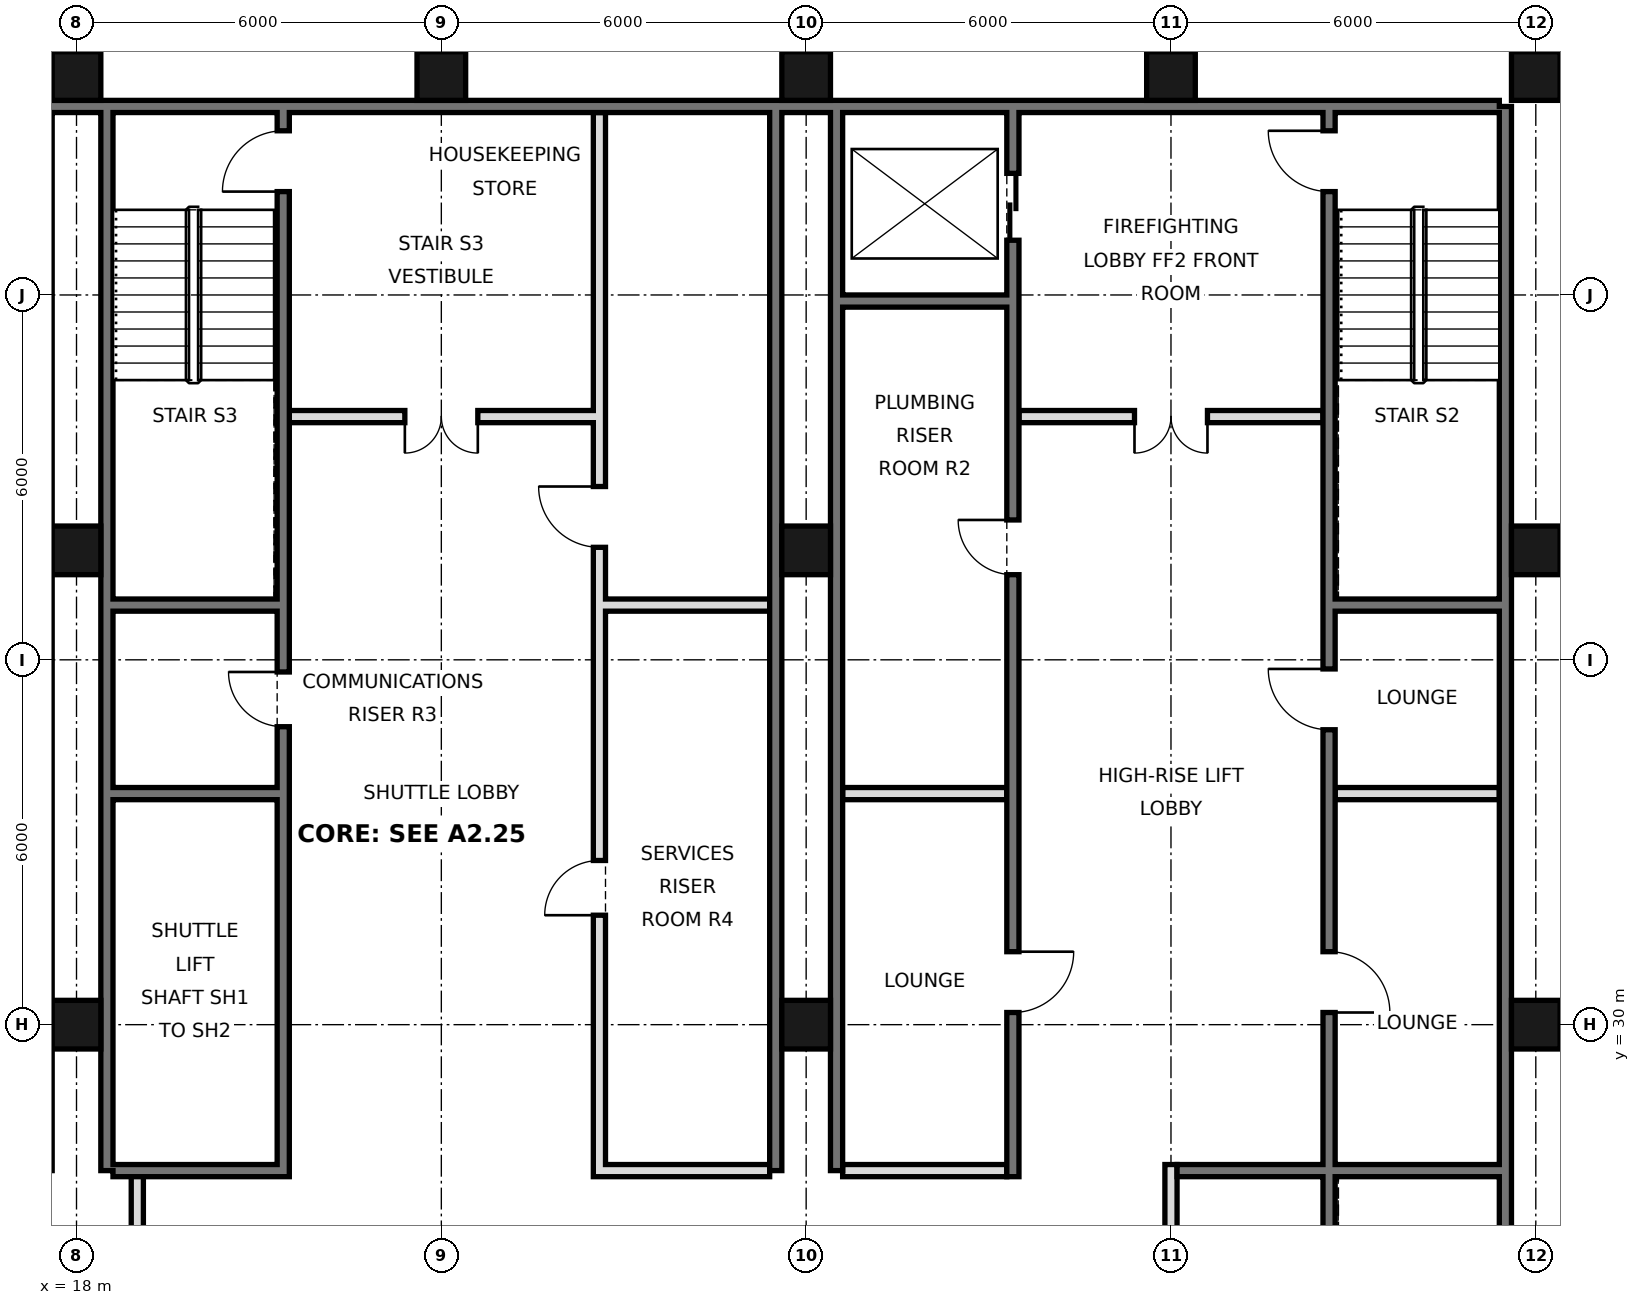
"""IFC4 building model, lengths in metres.
Left out: names, types, materials, properties, quantities, classifications, styles, units other than length and angle.
Written with IfcOpenShell. Run it as: python <this file> out.ifc"""

import sys

from ifc_helpers import new_model, si_unit, direction, frame, frame_2d, origin, origin_2d, place, context, subcontext, project, spatial, rectangle, hollow_rectangle, extrude, element, fill, save


model = new_model("IFC4")
c1 = context("Model", 3, precision=1e-05, world=origin(), true_north=direction((0.0, 1.0)))
c2 = subcontext(c1, "Body", "Model", "MODEL_VIEW")
j1 = project(units=[si_unit("LENGTHUNIT", "METRE"), si_unit("PLANEANGLEUNIT", "RADIAN")], contexts=[c1])
p1 = place(None, origin())
s1 = spatial("IfcSite", under=j1, at=p1, CompositionType="ELEMENT")
p2 = place(p1, origin())
s2 = spatial("IfcBuilding", under=s1, at=p2, CompositionType="ELEMENT")
p3 = place(p2, frame((0.0, 0.0, 99.8)))
s3 = spatial("IfcBuildingStorey", under=s2, at=p3, CompositionType="ELEMENT", Elevation=99.8)
for number, where, z_axis, x_axis in (
    (1, (18.0, 30.0, 0.0), (0.0, 0.0, 1.0), (1.0, 0.0, 0.0)),
    (2, (18.0, 37.8, 0.0), (0.0, 0.0, 1.0), (1.0, 0.0, 0.0)),
    (3, (18.0, 45.6, 0.0), (0.0, 0.0, 1.0), (1.0, 0.0, 0.0)),
    (4, (24.0, 45.6, 0.0), (0.0, 0.0, 1.0), (1.0, 0.0, 0.0)),
    (5, (30.0, 30.0, 0.0), (0.0, 0.0, 1.0), (1.0, 0.0, 0.0)),
    (6, (30.0, 37.8, 0.0), (0.0, 0.0, 1.0), (1.0, 0.0, 0.0)),
    (7, (30.0, 45.6, 0.0), (0.0, 0.0, 1.0), (1.0, 0.0, 0.0)),
    (8, (36.0, 45.6, 0.0), (0.0, 0.0, 1.0), (1.0, 0.0, 0.0)),
    (9, (42.0, 30.0, 0.0), (0.0, 0.0, 1.0), (1.0, 0.0, 0.0)),
    (10, (42.0, 37.8, 0.0), (0.0, 0.0, 1.0), (1.0, 0.0, 0.0)),
    (11, (42.0, 45.6, 0.0), (0.0, 0.0, 1.0), (1.0, 0.0, 0.0)),
):
    element("IfcColumn", number, at=place(p3, frame(where, z_axis=z_axis, x_axis=x_axis)), inside=s3, PredefinedType="COLUMN", context=c2, shape_type="SweptSolid", body=[
        extrude(hollow_rectangle(XDim=0.8, YDim=0.8, WallThickness=0.05, at=origin_2d()), origin(), (0.0, 0.0, 1.0), 3.6),
    ])
p4 = place(p3, frame((41.5, 21.6, 0.0), z_axis=(0.0, 0.0, 1.0), x_axis=(0.0, 1.0, 0.0)))
e12 = element("IfcWall", 12, at=p4, inside=s3, PredefinedType="SOLIDWALL", context=c2, shape_type="SweptSolid", body=[
    extrude(rectangle(XDim=23.5, YDim=0.2, at=frame_2d((11.75, 0.0))), origin(), (0.0, 0.0, 1.0), 3.42),
])
p5 = place(p3, frame((6.6, 45.1, 0.0), z_axis=(0.0, 0.0, 1.0), x_axis=(1.0, 0.0, 0.0)))
e13 = element("IfcWall", 13, at=p5, inside=s3, PredefinedType="SOLIDWALL", context=c2, shape_type="SweptSolid", body=[
    extrude(rectangle(XDim=34.8, YDim=0.2, at=frame_2d((17.4, 0.0))), origin(), (0.0, 0.0, 1.0), 3.42),
])
for number, where, z_axis, x_axis in (
    (14, (18.5, 27.6, 0.0), (0.0, 0.0, 1.0), (0.0, 1.0, 0.0)),
    (15, (29.5, 27.6, 0.0), (0.0, 0.0, 1.0), (0.0, 1.0, 0.0)),
    (16, (30.5, 27.6, 0.0), (0.0, 0.0, 1.0), (0.0, 1.0, 0.0)),
):
    element("IfcWall", number, at=place(p3, frame(where, z_axis=z_axis, x_axis=x_axis)), inside=s3, PredefinedType="SOLIDWALL", context=c2, shape_type="SweptSolid", body=[
        extrude(rectangle(XDim=17.5, YDim=0.2, at=frame_2d((8.75, 0.0))), origin(), (0.0, 0.0, 1.0), 3.42),
    ])
p6 = place(p3, frame((19.0, 21.6, 0.0), z_axis=(0.0, 0.0, 1.0), x_axis=(0.0, 1.0, 0.0)))
e17 = element("IfcWall", 17, at=p6, inside=s3, PredefinedType="PARTITIONING", context=c2, shape_type="SweptSolid", body=[
    extrude(rectangle(XDim=6.0, YDim=0.2, at=frame_2d((3.0, 0.0))), origin(), (0.0, 0.0, 1.0), 3.42),
])
p7 = place(p6, frame((2.1, 0.0, 0.0)))
e18 = element("IfcOpeningElement", 18, at=p7, cuts=e17, PredefinedType="OPENING", context=c2, shape_type="SweptSolid", body=[
    extrude(rectangle(XDim=1.8, YDim=2.1, at=frame_2d((0.9, 1.05))), frame((0.0, 0.11, 0.0), z_axis=(0.0, -1.0, 0.0), x_axis=(1.0, 0.0, 0.0)), (0.0, 0.0, 1.0), 0.22),
])
p8 = place(p3, frame((21.4, 27.5, 0.0), z_axis=(0.0, 0.0, 1.0), x_axis=(0.0, 1.0, 0.0)))
e19 = element("IfcWall", 19, at=p8, inside=s3, PredefinedType="SOLIDWALL", context=c2, shape_type="SweptSolid", body=[
    extrude(rectangle(XDim=17.5, YDim=0.2, at=frame_2d((8.75, 0.0))), origin(), (0.0, 0.0, 1.0), 3.42),
])
p9 = place(p8, frame((16.2, 0.0, 0.0)))
e20 = element("IfcOpeningElement", 20, at=p9, cuts=e19, PredefinedType="OPENING", context=c2, shape_type="SweptSolid", body=[
    extrude(rectangle(XDim=1.0, YDim=2.1, at=frame_2d((0.5, 1.05))), frame((0.0, 0.11, 0.0), z_axis=(0.0, -1.0, 0.0), x_axis=(1.0, 0.0, 0.0)), (0.0, 0.0, 1.0), 0.22),
])
p10 = place(p8, frame((7.4, 0.0, 0.0)))
e21 = element("IfcOpeningElement", 21, at=p10, cuts=e19, PredefinedType="OPENING", context=c2, shape_type="SweptSolid", body=[
    extrude(rectangle(XDim=0.9, YDim=2.1, at=frame_2d((0.45, 1.05))), frame((0.0, 0.11, 0.0), z_axis=(0.0, -1.0, 0.0), x_axis=(1.0, 0.0, 0.0)), (0.0, 0.0, 1.0), 0.22),
])
p11 = place(p3, frame((26.6, 27.5, 0.0), z_axis=(0.0, 0.0, 1.0), x_axis=(0.0, 1.0, 0.0)))
e22 = element("IfcWall", 22, at=p11, inside=s3, PredefinedType="SOLIDWALL", context=c2, shape_type="SweptSolid", body=[
    extrude(rectangle(XDim=17.5, YDim=0.2, at=frame_2d((8.75, 0.0))), origin(), (0.0, 0.0, 1.0), 3.42),
])
p12 = place(p11, frame((4.3, 0.0, 0.0)))
e23 = element("IfcOpeningElement", 23, at=p12, cuts=e22, PredefinedType="OPENING", context=c2, shape_type="SweptSolid", body=[
    extrude(rectangle(XDim=0.9, YDim=2.1, at=frame_2d((0.45, 1.05))), frame((0.0, 0.11, 0.0), z_axis=(0.0, -1.0, 0.0), x_axis=(1.0, 0.0, 0.0)), (0.0, 0.0, 1.0), 0.22),
])
p13 = place(p11, frame((10.35, 0.0, 0.0)))
e24 = element("IfcOpeningElement", 24, at=p13, cuts=e22, PredefinedType="OPENING", context=c2, shape_type="SweptSolid", body=[
    extrude(rectangle(XDim=1.0, YDim=2.1, at=frame_2d((0.5, 1.05))), frame((0.0, 0.11, 0.0), z_axis=(0.0, -1.0, 0.0), x_axis=(1.0, 0.0, 0.0)), (0.0, 0.0, 1.0), 0.22),
])
p14 = place(p3, frame((33.4, 27.5, 0.0), z_axis=(0.0, 0.0, 1.0), x_axis=(0.0, 1.0, 0.0)))
e25 = element("IfcWall", 25, at=p14, inside=s3, PredefinedType="SOLIDWALL", context=c2, shape_type="SweptSolid", body=[
    extrude(rectangle(XDim=17.5, YDim=0.2, at=frame_2d((8.75, 0.0))), origin(), (0.0, 0.0, 1.0), 3.42),
])
p15 = place(p14, frame((15.4, 0.0, 0.0)))
e26 = element("IfcOpeningElement", 26, at=p15, cuts=e25, PredefinedType="OPENING", context=c2, shape_type="SweptSolid", body=[
    extrude(rectangle(XDim=1.1, YDim=2.1, at=frame_2d((0.55, 1.05))), frame((0.0, 0.11, 0.0), z_axis=(0.0, -1.0, 0.0), x_axis=(1.0, 0.0, 0.0)), (0.0, 0.0, 1.0), 0.22),
])
p16 = place(p14, frame((2.7, 0.0, 0.0)))
e27 = element("IfcOpeningElement", 27, at=p16, cuts=e25, PredefinedType="OPENING", context=c2, shape_type="SweptSolid", body=[
    extrude(rectangle(XDim=1.0, YDim=2.1, at=frame_2d((0.5, 1.05))), frame((0.0, 0.11, 0.0), z_axis=(0.0, -1.0, 0.0), x_axis=(1.0, 0.0, 0.0)), (0.0, 0.0, 1.0), 0.22),
])
p17 = place(p14, frame((9.9, 0.0, 0.0)))
e28 = element("IfcOpeningElement", 28, at=p17, cuts=e25, PredefinedType="OPENING", context=c2, shape_type="SweptSolid", body=[
    extrude(rectangle(XDim=0.9, YDim=2.1, at=frame_2d((0.45, 1.05))), frame((0.0, 0.11, 0.0), z_axis=(0.0, -1.0, 0.0), x_axis=(1.0, 0.0, 0.0)), (0.0, 0.0, 1.0), 0.22),
])
p18 = place(p3, frame((36.0, 21.6, 0.0), z_axis=(0.0, 0.0, 1.0), x_axis=(0.0, 1.0, 0.0)))
e29 = element("IfcWall", 29, at=p18, inside=s3, PredefinedType="PARTITIONING", context=c2, shape_type="SweptSolid", body=[
    extrude(rectangle(XDim=6.1, YDim=0.2, at=frame_2d((3.05, 0.0))), origin(), (0.0, 0.0, 1.0), 3.42),
])
p19 = place(p3, frame((38.6, 21.6, 0.0), z_axis=(0.0, 0.0, 1.0), x_axis=(0.0, 1.0, 0.0)))
e30 = element("IfcWall", 30, at=p19, inside=s3, PredefinedType="SOLIDWALL", context=c2, shape_type="SweptSolid", body=[
    extrude(rectangle(XDim=23.4, YDim=0.2, at=frame_2d((11.7, 0.0))), origin(), (0.0, 0.0, 1.0), 3.42),
])
p20 = place(p19, frame((8.6, 0.0, 0.0)))
e31 = element("IfcOpeningElement", 31, at=p20, cuts=e30, PredefinedType="OPENING", context=c2, shape_type="SweptSolid", body=[
    extrude(rectangle(XDim=1.0, YDim=2.1, at=frame_2d((0.5, 1.05))), frame((0.0, 0.11, 0.0), z_axis=(0.0, -1.0, 0.0), x_axis=(1.0, 0.0, 0.0)), (0.0, 0.0, 1.0), 0.22),
])
p21 = place(p19, frame((13.25, 0.0, 0.0)))
e32 = element("IfcOpeningElement", 32, at=p21, cuts=e30, PredefinedType="OPENING", context=c2, shape_type="SweptSolid", body=[
    extrude(rectangle(XDim=1.0, YDim=2.1, at=frame_2d((0.5, 1.05))), frame((0.0, 0.11, 0.0), z_axis=(0.0, -1.0, 0.0), x_axis=(1.0, 0.0, 0.0)), (0.0, 0.0, 1.0), 0.22),
])
p22 = place(p19, frame((22.1, 0.0, 0.0)))
e33 = element("IfcOpeningElement", 33, at=p22, cuts=e30, PredefinedType="OPENING", context=c2, shape_type="SweptSolid", body=[
    extrude(rectangle(XDim=1.0, YDim=2.1, at=frame_2d((0.5, 1.05))), frame((0.0, 0.11, 0.0), z_axis=(0.0, -1.0, 0.0), x_axis=(1.0, 0.0, 0.0)), (0.0, 0.0, 1.0), 0.22),
])
p23 = place(p19, frame((0.175, 0.0, 0.0)))
e34 = element("IfcOpeningElement", 34, at=p23, cuts=e30, PredefinedType="OPENING", context=c2, shape_type="SweptSolid", body=[
    extrude(rectangle(XDim=0.9, YDim=2.1, at=frame_2d((0.45, 1.05))), frame((0.0, 0.11, 0.0), z_axis=(0.0, -1.0, 0.0), x_axis=(1.0, 0.0, 0.0)), (0.0, 0.0, 1.0), 0.22),
])
for number, where, z_axis, x_axis in (
    (35, (18.6, 27.6, 0.0), (0.0, 0.0, 1.0), (1.0, 0.0, 0.0)),
    (36, (26.7, 27.6, 0.0), (0.0, 0.0, 1.0), (1.0, 0.0, 0.0)),
):
    element("IfcWall", number, at=place(p3, frame(where, z_axis=z_axis, x_axis=x_axis)), inside=s3, PredefinedType="SOLIDWALL", context=c2, shape_type="SweptSolid", body=[
        extrude(rectangle(XDim=2.7, YDim=0.2, at=frame_2d((1.35, 0.0))), origin(), (0.0, 0.0, 1.0), 3.42),
    ])
p24 = place(p3, frame((30.6, 27.6, 0.0), z_axis=(0.0, 0.0, 1.0), x_axis=(1.0, 0.0, 0.0)))
e37 = element("IfcWall", 37, at=p24, inside=s3, PredefinedType="PARTITIONING", context=c2, shape_type="SweptSolid", body=[
    extrude(rectangle(XDim=2.7, YDim=0.2, at=frame_2d((1.35, 0.0))), origin(), (0.0, 0.0, 1.0), 3.42),
])
p25 = place(p3, frame((36.1, 27.6, 0.0), z_axis=(0.0, 0.0, 1.0), x_axis=(1.0, 0.0, 0.0)))
e38 = element("IfcWall", 38, at=p25, inside=s3, PredefinedType="SOLIDWALL", context=c2, shape_type="SweptSolid", body=[
    extrude(rectangle(XDim=5.3, YDim=0.2, at=frame_2d((2.65, 0.0))), origin(), (0.0, 0.0, 1.0), 3.42),
])
for number, where, z_axis, x_axis in (
    (39, (18.6, 33.8, 0.0), (0.0, 0.0, 1.0), (1.0, 0.0, 0.0)),
    (40, (30.6, 33.8, 0.0), (0.0, 0.0, 1.0), (1.0, 0.0, 0.0)),
):
    element("IfcWall", number, at=place(p3, frame(where, z_axis=z_axis, x_axis=x_axis)), inside=s3, PredefinedType="SOLIDWALL", context=c2, shape_type="SweptSolid", body=[
        extrude(rectangle(XDim=2.7, YDim=0.2, at=frame_2d((1.35, 0.0))), origin(), (0.0, 0.0, 1.0), 3.42),
    ])
p26 = place(p3, frame((38.7, 33.8, 0.0), z_axis=(0.0, 0.0, 1.0), x_axis=(1.0, 0.0, 0.0)))
e41 = element("IfcWall", 41, at=p26, inside=s3, PredefinedType="PARTITIONING", context=c2, shape_type="SweptSolid", body=[
    extrude(rectangle(XDim=2.7, YDim=0.2, at=frame_2d((1.35, 0.0))), origin(), (0.0, 0.0, 1.0), 3.42),
])
for number, where, z_axis, x_axis in (
    (42, (18.6, 36.9, 0.0), (0.0, 0.0, 1.0), (1.0, 0.0, 0.0)),
    (43, (26.7, 36.9, 0.0), (0.0, 0.0, 1.0), (1.0, 0.0, 0.0)),
    (44, (38.7, 36.9, 0.0), (0.0, 0.0, 1.0), (1.0, 0.0, 0.0)),
):
    element("IfcWall", number, at=place(p3, frame(where, z_axis=z_axis, x_axis=x_axis)), inside=s3, PredefinedType="SOLIDWALL", context=c2, shape_type="SweptSolid", body=[
        extrude(rectangle(XDim=2.7, YDim=0.2, at=frame_2d((1.35, 0.0))), origin(), (0.0, 0.0, 1.0), 3.42),
    ])
p27 = place(p3, frame((21.5, 40.0, 0.0), z_axis=(0.0, 0.0, 1.0), x_axis=(1.0, 0.0, 0.0)))
e45 = element("IfcWall", 45, at=p27, inside=s3, PredefinedType="PARTITIONING", context=c2, shape_type="SweptSolid", body=[
    extrude(rectangle(XDim=5.0, YDim=0.2, at=frame_2d((2.5, 0.0))), origin(), (0.0, 0.0, 1.0), 3.42),
])
p28 = place(p27, frame((1.9, 0.0, 0.0)))
e46 = element("IfcOpeningElement", 46, at=p28, cuts=e45, PredefinedType="OPENING", context=c2, shape_type="SweptSolid", body=[
    extrude(rectangle(XDim=1.2, YDim=2.1, at=frame_2d((0.6, 1.05))), frame((0.0, 0.11, 0.0), z_axis=(0.0, -1.0, 0.0), x_axis=(1.0, 0.0, 0.0)), (0.0, 0.0, 1.0), 0.22),
])
p29 = place(p3, frame((33.5, 40.0, 0.0), z_axis=(0.0, 0.0, 1.0), x_axis=(1.0, 0.0, 0.0)))
e47 = element("IfcWall", 47, at=p29, inside=s3, PredefinedType="PARTITIONING", context=c2, shape_type="SweptSolid", body=[
    extrude(rectangle(XDim=5.0, YDim=0.2, at=frame_2d((2.5, 0.0))), origin(), (0.0, 0.0, 1.0), 3.42),
])
p30 = place(p29, frame((1.9, 0.0, 0.0)))
e48 = element("IfcOpeningElement", 48, at=p30, cuts=e47, PredefinedType="OPENING", context=c2, shape_type="SweptSolid", body=[
    extrude(rectangle(XDim=1.2, YDim=2.1, at=frame_2d((0.6, 1.05))), frame((0.0, 0.11, 0.0), z_axis=(0.0, -1.0, 0.0), x_axis=(1.0, 0.0, 0.0)), (0.0, 0.0, 1.0), 0.22),
])
p31 = place(p3, frame((30.6, 41.9, 0.0), z_axis=(0.0, 0.0, 1.0), x_axis=(1.0, 0.0, 0.0)))
e49 = element("IfcWall", 49, at=p31, inside=s3, PredefinedType="SOLIDWALL", context=c2, shape_type="SweptSolid", body=[
    extrude(rectangle(XDim=2.7, YDim=0.2, at=frame_2d((1.35, 0.0))), origin(), (0.0, 0.0, 1.0), 3.42),
])
p32 = place(p28, frame((1.2, 0.0, 0.0), z_axis=(0.0, 0.0, 1.0), x_axis=(-1.0, 0.0, 0.0)))
e50 = element("IfcDoor", 50, at=p32, inside=s3, OperationType="DOUBLE_DOOR_SINGLE_SWING", PredefinedType="DOOR", context=c2, shape_type="SweptSolid", body=[
    extrude(rectangle(XDim=1.2, YDim=2.1, at=frame_2d((0.6, 1.05))), frame((0.0, 0.025, 0.0), z_axis=(0.0, -1.0, 0.0), x_axis=(1.0, 0.0, 0.0)), (0.0, 0.0, 1.0), 0.05),
])
fill(e46, e50)
p33 = place(p30, frame((1.2, 0.0, 0.0), z_axis=(0.0, 0.0, 1.0), x_axis=(-1.0, 0.0, 0.0)))
e51 = element("IfcDoor", 51, at=p33, inside=s3, OperationType="DOUBLE_DOOR_SINGLE_SWING", PredefinedType="DOOR", context=c2, shape_type="SweptSolid", body=[
    extrude(rectangle(XDim=1.2, YDim=2.1, at=frame_2d((0.6, 1.05))), frame((0.0, 0.025, 0.0), z_axis=(0.0, -1.0, 0.0), x_axis=(1.0, 0.0, 0.0)), (0.0, 0.0, 1.0), 0.05),
])
fill(e48, e51)
p34 = place(p15, origin())
e52 = element("IfcDoor", 52, at=p34, inside=s3, OperationType="DOUBLE_DOOR_SLIDING", PredefinedType="DOOR", context=c2, shape_type="SweptSolid", body=[
    extrude(rectangle(XDim=1.1, YDim=2.1, at=frame_2d((0.55, 1.05))), frame((0.0, 0.025, 0.0), z_axis=(0.0, -1.0, 0.0), x_axis=(1.0, 0.0, 0.0)), (0.0, 0.0, 1.0), 0.05),
])
fill(e26, e52)
p35 = place(p20, frame((1.0, 0.0, 0.0), z_axis=(0.0, 0.0, 1.0), x_axis=(-1.0, 0.0, 0.0)))
e53 = element("IfcDoor", 53, at=p35, inside=s3, OperationType="SINGLE_SWING_RIGHT", PredefinedType="DOOR", context=c2, shape_type="SweptSolid", body=[
    extrude(rectangle(XDim=1.0, YDim=2.1, at=frame_2d((0.5, 1.05))), frame((0.0, 0.025, 0.0), z_axis=(0.0, -1.0, 0.0), x_axis=(1.0, 0.0, 0.0)), (0.0, 0.0, 1.0), 0.05),
])
fill(e31, e53)
p36 = place(p21, frame((1.0, 0.0, 0.0), z_axis=(0.0, 0.0, 1.0), x_axis=(-1.0, 0.0, 0.0)))
e54 = element("IfcDoor", 54, at=p36, inside=s3, OperationType="SINGLE_SWING_LEFT", PredefinedType="DOOR", context=c2, shape_type="SweptSolid", body=[
    extrude(rectangle(XDim=1.0, YDim=2.1, at=frame_2d((0.5, 1.05))), frame((0.0, 0.025, 0.0), z_axis=(0.0, -1.0, 0.0), x_axis=(1.0, 0.0, 0.0)), (0.0, 0.0, 1.0), 0.05),
])
fill(e32, e54)
p37 = place(p16, origin())
e55 = element("IfcDoor", 55, at=p37, inside=s3, OperationType="SINGLE_SWING_RIGHT", PredefinedType="DOOR", context=c2, shape_type="SweptSolid", body=[
    extrude(rectangle(XDim=1.0, YDim=2.1, at=frame_2d((0.5, 1.05))), frame((0.0, 0.025, 0.0), z_axis=(0.0, -1.0, 0.0), x_axis=(1.0, 0.0, 0.0)), (0.0, 0.0, 1.0), 0.05),
])
fill(e27, e55)
p38 = place(p22, frame((1.0, 0.0, 0.0), z_axis=(0.0, 0.0, 1.0), x_axis=(-1.0, 0.0, 0.0)))
e56 = element("IfcDoor", 56, at=p38, inside=s3, OperationType="SINGLE_SWING_LEFT", PredefinedType="DOOR", context=c2, shape_type="SweptSolid", body=[
    extrude(rectangle(XDim=1.0, YDim=2.1, at=frame_2d((0.5, 1.05))), frame((0.0, 0.025, 0.0), z_axis=(0.0, -1.0, 0.0), x_axis=(1.0, 0.0, 0.0)), (0.0, 0.0, 1.0), 0.05),
])
fill(e33, e56)
p39 = place(p9, origin())
e57 = element("IfcDoor", 57, at=p39, inside=s3, OperationType="SINGLE_SWING_LEFT", PredefinedType="DOOR", context=c2, shape_type="SweptSolid", body=[
    extrude(rectangle(XDim=1.0, YDim=2.1, at=frame_2d((0.5, 1.05))), frame((0.0, 0.025, 0.0), z_axis=(0.0, -1.0, 0.0), x_axis=(1.0, 0.0, 0.0)), (0.0, 0.0, 1.0), 0.05),
])
fill(e20, e57)
p40 = place(p17, frame((0.9, 0.0, 0.0), z_axis=(0.0, 0.0, 1.0), x_axis=(-1.0, 0.0, 0.0)))
e58 = element("IfcDoor", 58, at=p40, inside=s3, OperationType="SINGLE_SWING_LEFT", PredefinedType="DOOR", context=c2, shape_type="SweptSolid", body=[
    extrude(rectangle(XDim=0.9, YDim=2.1, at=frame_2d((0.45, 1.05))), frame((0.0, 0.025, 0.0), z_axis=(0.0, -1.0, 0.0), x_axis=(1.0, 0.0, 0.0)), (0.0, 0.0, 1.0), 0.05),
])
fill(e28, e58)
p41 = place(p10, frame((0.9, 0.0, 0.0), z_axis=(0.0, 0.0, 1.0), x_axis=(-1.0, 0.0, 0.0)))
e59 = element("IfcDoor", 59, at=p41, inside=s3, OperationType="SINGLE_SWING_LEFT", PredefinedType="DOOR", context=c2, shape_type="SweptSolid", body=[
    extrude(rectangle(XDim=0.9, YDim=2.1, at=frame_2d((0.45, 1.05))), frame((0.0, 0.025, 0.0), z_axis=(0.0, -1.0, 0.0), x_axis=(1.0, 0.0, 0.0)), (0.0, 0.0, 1.0), 0.05),
])
fill(e21, e59)
p42 = place(p12, origin())
e60 = element("IfcDoor", 60, at=p42, inside=s3, OperationType="SINGLE_SWING_LEFT", PredefinedType="DOOR", context=c2, shape_type="SweptSolid", body=[
    extrude(rectangle(XDim=0.9, YDim=2.1, at=frame_2d((0.45, 1.05))), frame((0.0, 0.025, 0.0), z_axis=(0.0, -1.0, 0.0), x_axis=(1.0, 0.0, 0.0)), (0.0, 0.0, 1.0), 0.05),
])
fill(e23, e60)
p43 = place(p13, frame((1.0, 0.0, 0.0), z_axis=(0.0, 0.0, 1.0), x_axis=(-1.0, 0.0, 0.0)))
e61 = element("IfcDoor", 61, at=p43, inside=s3, OperationType="SINGLE_SWING_LEFT", PredefinedType="DOOR", context=c2, shape_type="SweptSolid", body=[
    extrude(rectangle(XDim=1.0, YDim=2.1, at=frame_2d((0.5, 1.05))), frame((0.0, 0.025, 0.0), z_axis=(0.0, -1.0, 0.0), x_axis=(1.0, 0.0, 0.0)), (0.0, 0.0, 1.0), 0.05),
])
fill(e24, e61)
save(model, sys.argv[1])
